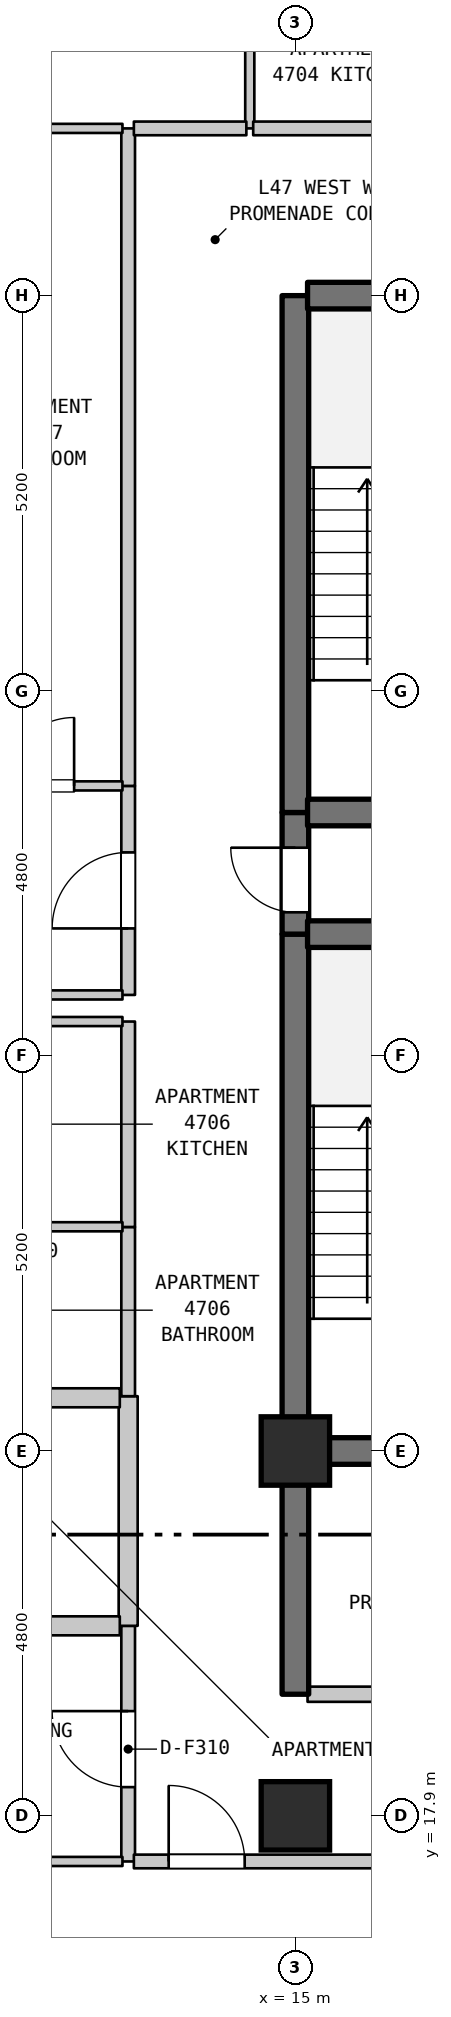
"""IFC4 building model, lengths in metres.
Left out: names, types, materials, properties, quantities, classifications, styles, units other than length and angle.
Written with IfcOpenShell. Run it as: python <this file> out.ifc"""

import sys

from ifc_helpers import new_model, si_unit, direction, frame, frame_2d, origin, origin_2d, place, context, subcontext, project, spatial, rectangle, extrude, element, fill, save


model = new_model("IFC4")
c1 = context("Model", 3, precision=1e-05, world=origin(), true_north=direction((0.0, 1.0)))
c2 = subcontext(c1, "Body", "Model", "MODEL_VIEW")
j1 = project(units=[si_unit("LENGTHUNIT", "METRE"), si_unit("PLANEANGLEUNIT", "RADIAN")], contexts=[c1])
p1 = place(None, origin())
s1 = spatial("IfcSite", under=j1, at=p1, CompositionType="ELEMENT")
p2 = place(p1, origin())
s2 = spatial("IfcBuilding", under=s1, at=p2, CompositionType="ELEMENT")
p3 = place(p2, frame((0.0, 0.0, 192.1)))
s3 = spatial("IfcBuildingStorey", under=s2, at=p3, CompositionType="ELEMENT", Elevation=192.1)
for number, where, z_axis, x_axis in (
    (1, (15.0, 17.9, 0.0), (0.0, 0.0, 1.0), (1.0, 0.0, 0.0)),
    (2, (15.0, 22.7, 0.0), (0.0, 0.0, 1.0), (1.0, 0.0, 0.0)),
):
    element("IfcColumn", number, at=place(p3, frame(where, z_axis=z_axis, x_axis=x_axis)), inside=s3, PredefinedType="COLUMN", context=c2, shape_type="SweptSolid", body=[
        extrude(rectangle(XDim=0.9, YDim=0.9, at=origin_2d()), origin(), (0.0, 0.0, 1.0), 3.7),
    ])
p4 = place(p3, frame((12.8, 17.3, 0.0), z_axis=(0.0, 0.0, 1.0), x_axis=(0.0, 1.0, 0.0)))
e3 = element("IfcWall", 3, at=p4, inside=s3, PredefinedType="STANDARD", context=c2, shape_type="SweptSolid", body=[
    extrude(rectangle(XDim=3.1, YDim=0.18, at=frame_2d((1.55, 0.0))), origin(), (0.0, 0.0, 1.0), 3.39),
])
p5 = place(p4, frame((0.978, 0.0, 0.0)))
e4 = element("IfcOpeningElement", 4, at=p5, cuts=e3, PredefinedType="OPENING", context=c2, shape_type="SweptSolid", body=[
    extrude(rectangle(XDim=1.0, YDim=2.15, at=frame_2d((0.5, 1.075))), frame((0.0, 0.1, 0.0), z_axis=(0.0, -1.0, 0.0), x_axis=(1.0, 0.0, 0.0)), (0.0, 0.0, 1.0), 0.2),
])
p6 = place(p3, frame((12.8, 20.4, 0.0), z_axis=(0.0, 0.0, 1.0), x_axis=(0.0, 1.0, 0.0)))
e5 = element("IfcWall", 5, at=p6, inside=s3, PredefinedType="STANDARD", context=c2, shape_type="SweptSolid", body=[
    extrude(rectangle(XDim=3.021, YDim=0.25, at=frame_2d((1.51, 0.0))), origin(), (0.0, 0.0, 1.0), 3.39),
])
p7 = place(p3, frame((12.8, 23.421, 0.0), z_axis=(0.0, 0.0, 1.0), x_axis=(0.0, 1.0, 0.0)))
e6 = element("IfcWall", 6, at=p7, inside=s3, PredefinedType="STANDARD", context=c2, shape_type="SweptSolid", body=[
    extrude(rectangle(XDim=2.226, YDim=0.18, at=frame_2d((1.113, 0.0))), origin(), (0.0, 0.0, 1.0), 3.39),
])
p8 = place(p3, frame((12.8, 25.647, 0.0), z_axis=(0.0, 0.0, 1.0), x_axis=(0.0, 1.0, 0.0)))
e7 = element("IfcWall", 7, at=p8, inside=s3, PredefinedType="STANDARD", context=c2, shape_type="SweptSolid", body=[
    extrude(rectangle(XDim=2.703, YDim=0.18, at=frame_2d((1.352, 0.0))), origin(), (0.0, 0.0, 1.0), 3.39),
])
p9 = place(p3, frame((12.8, 28.7, 0.0), z_axis=(0.0, 0.0, 1.0), x_axis=(0.0, 1.0, 0.0)))
e8 = element("IfcWall", 8, at=p9, inside=s3, PredefinedType="STANDARD", context=c2, shape_type="SweptSolid", body=[
    extrude(rectangle(XDim=2.75, YDim=0.18, at=frame_2d((1.375, 0.0))), origin(), (0.0, 0.0, 1.0), 3.39),
])
p10 = place(p9, frame((0.875, 0.0, 0.0)))
e9 = element("IfcOpeningElement", 9, at=p10, cuts=e8, PredefinedType="OPENING", context=c2, shape_type="SweptSolid", body=[
    extrude(rectangle(XDim=1.0, YDim=2.15, at=frame_2d((0.5, 1.075))), frame((0.0, 0.1, 0.0), z_axis=(0.0, -1.0, 0.0), x_axis=(1.0, 0.0, 0.0)), (0.0, 0.0, 1.0), 0.2),
])
p11 = place(p3, frame((12.8, 31.45, 0.0), z_axis=(0.0, 0.0, 1.0), x_axis=(0.0, 1.0, 0.0)))
e10 = element("IfcWall", 10, at=p11, inside=s3, PredefinedType="STANDARD", context=c2, shape_type="SweptSolid", body=[
    extrude(rectangle(XDim=8.65, YDim=0.18, at=frame_2d((4.325, 0.0))), origin(), (0.0, 0.0, 1.0), 3.39),
])
p12 = place(p3, frame((14.4, 40.1, 0.0), z_axis=(0.0, 0.0, 1.0), x_axis=(0.0, 1.0, 0.0)))
e11 = element("IfcWall", 11, at=p12, inside=s3, PredefinedType="PARTITIONING", context=c2, shape_type="SweptSolid", body=[
    extrude(rectangle(XDim=2.3, YDim=0.12, at=frame_2d((1.15, 0.0))), origin(), (0.0, 0.0, 1.0), 3.39),
])
p13 = place(p3, frame((15.0, 19.5, 0.0), z_axis=(0.0, 0.0, 1.0), x_axis=(0.0, 1.0, 0.0)))
e12 = element("IfcWall", 12, at=p13, inside=s3, PredefinedType="SHEAR", context=c2, shape_type="SweptSolid", body=[
    extrude(rectangle(XDim=3.2, YDim=0.35, at=frame_2d((1.6, 0.0))), origin(), (0.0, 0.0, 1.0), 3.39),
])
p14 = place(p3, frame((15.0, 22.7, 0.0), z_axis=(0.0, 0.0, 1.0), x_axis=(0.0, 1.0, 0.0)))
e13 = element("IfcWall", 13, at=p14, inside=s3, PredefinedType="SHEAR", context=c2, shape_type="SweptSolid", body=[
    extrude(rectangle(XDim=6.8, YDim=0.35, at=frame_2d((3.4, 0.0))), origin(), (0.0, 0.0, 1.0), 3.39),
])
p15 = place(p3, frame((15.0, 29.5, 0.0), z_axis=(0.0, 0.0, 1.0), x_axis=(0.0, 1.0, 0.0)))
e14 = element("IfcWall", 14, at=p15, inside=s3, PredefinedType="SHEAR", context=c2, shape_type="SweptSolid", body=[
    extrude(rectangle(XDim=1.6, YDim=0.35, at=frame_2d((0.8, 0.0))), origin(), (0.0, 0.0, 1.0), 3.39),
])
p16 = place(p15, frame((0.287, 0.0, 0.0)))
e15 = element("IfcOpeningElement", 15, at=p16, cuts=e14, PredefinedType="OPENING", context=c2, shape_type="SweptSolid", body=[
    extrude(rectangle(XDim=0.85, YDim=2.1, at=frame_2d((0.425, 1.05))), frame((0.0, 0.185, 0.0), z_axis=(0.0, -1.0, 0.0), x_axis=(1.0, 0.0, 0.0)), (0.0, 0.0, 1.0), 0.37),
])
p17 = place(p3, frame((15.0, 31.1, 0.0), z_axis=(0.0, 0.0, 1.0), x_axis=(0.0, 1.0, 0.0)))
e16 = element("IfcWall", 16, at=p17, inside=s3, PredefinedType="SHEAR", context=c2, shape_type="SweptSolid", body=[
    extrude(rectangle(XDim=6.8, YDim=0.35, at=frame_2d((3.4, 0.0))), origin(), (0.0, 0.0, 1.0), 3.39),
])
p18 = place(p3, frame((9.085, 17.3, 0.0), z_axis=(0.0, 0.0, 1.0), x_axis=(1.0, 0.0, 0.0)))
e17 = element("IfcWall", 17, at=p18, inside=s3, PredefinedType="PARTITIONING", context=c2, shape_type="SweptSolid", body=[
    extrude(rectangle(XDim=3.64, YDim=0.12, at=frame_2d((1.82, 0.0))), origin(), (0.0, 0.0, 1.0), 3.39),
])
p19 = place(p3, frame((12.875, 17.3, 0.0), z_axis=(0.0, 0.0, 1.0), x_axis=(1.0, 0.0, 0.0)))
e18 = element("IfcWall", 18, at=p19, inside=s3, PredefinedType="STANDARD", context=c2, shape_type="SweptSolid", body=[
    extrude(rectangle(XDim=3.78, YDim=0.18, at=frame_2d((1.89, 0.0))), origin(), (0.0, 0.0, 1.0), 3.39),
])
p20 = place(p19, frame((0.458, 0.0, 0.0)))
e19 = element("IfcOpeningElement", 19, at=p20, cuts=e18, PredefinedType="OPENING", context=c2, shape_type="SweptSolid", body=[
    extrude(rectangle(XDim=1.0, YDim=2.15, at=frame_2d((0.5, 1.075))), frame((0.0, 0.1, 0.0), z_axis=(0.0, -1.0, 0.0), x_axis=(1.0, 0.0, 0.0)), (0.0, 0.0, 1.0), 0.2),
])
p21 = place(p3, frame((15.16, 19.5, 0.0), z_axis=(0.0, 0.0, 1.0), x_axis=(1.0, 0.0, 0.0)))
e20 = element("IfcWall", 20, at=p21, inside=s3, PredefinedType="STANDARD", context=c2, shape_type="SweptSolid", body=[
    extrude(rectangle(XDim=3.68, YDim=0.2, at=frame_2d((1.84, 0.0))), origin(), (0.0, 0.0, 1.0), 3.39),
])
p22 = place(p21, frame((1.39, 0.0, 0.0)))
e21 = element("IfcOpeningElement", 21, at=p22, cuts=e20, PredefinedType="OPENING", context=c2, shape_type="SweptSolid", body=[
    extrude(rectangle(XDim=0.9, YDim=2.15, at=frame_2d((0.45, 1.075))), frame((0.0, 0.11, 0.0), z_axis=(0.0, -1.0, 0.0), x_axis=(1.0, 0.0, 0.0)), (0.0, 0.0, 1.0), 0.22),
])
p23 = place(p3, frame((10.66, 20.4, 0.0), z_axis=(0.0, 0.0, 1.0), x_axis=(1.0, 0.0, 0.0)))
e22 = element("IfcWall", 22, at=p23, inside=s3, PredefinedType="STANDARD", context=c2, shape_type="SweptSolid", body=[
    extrude(rectangle(XDim=2.03, YDim=0.25, at=frame_2d((1.015, 0.0))), origin(), (0.0, 0.0, 1.0), 3.39),
])
p24 = place(p3, frame((15.16, 22.7, 0.0), z_axis=(0.0, 0.0, 1.0), x_axis=(1.0, 0.0, 0.0)))
e23 = element("IfcWall", 23, at=p24, inside=s3, PredefinedType="SHEAR", context=c2, shape_type="SweptSolid", body=[
    extrude(rectangle(XDim=3.68, YDim=0.35, at=frame_2d((1.84, 0.0))), origin(), (0.0, 0.0, 1.0), 3.39),
])
p25 = place(p3, frame((10.66, 23.4, 0.0), z_axis=(0.0, 0.0, 1.0), x_axis=(1.0, 0.0, 0.0)))
e24 = element("IfcWall", 24, at=p25, inside=s3, PredefinedType="STANDARD", context=c2, shape_type="SweptSolid", body=[
    extrude(rectangle(XDim=2.03, YDim=0.25, at=frame_2d((1.015, 0.0))), origin(), (0.0, 0.0, 1.0), 3.39),
])
for number, where, z_axis, x_axis in (
    (25, (10.595, 25.65, 0.0), (0.0, 0.0, 1.0), (1.0, 0.0, 0.0)),
    (26, (10.595, 28.35, 0.0), (0.0, 0.0, 1.0), (1.0, 0.0, 0.0)),
):
    element("IfcWall", number, at=place(p3, frame(where, z_axis=z_axis, x_axis=x_axis)), inside=s3, PredefinedType="PARTITIONING", context=c2, shape_type="SweptSolid", body=[
        extrude(rectangle(XDim=2.13, YDim=0.12, at=frame_2d((1.065, 0.0))), origin(), (0.0, 0.0, 1.0), 3.39),
    ])
p26 = place(p3, frame((9.03, 28.7, 0.0), z_axis=(0.0, 0.0, 1.0), x_axis=(1.0, 0.0, 0.0)))
e27 = element("IfcWall", 27, at=p26, inside=s3, PredefinedType="PARTITIONING", context=c2, shape_type="SweptSolid", body=[
    extrude(rectangle(XDim=3.695, YDim=0.12, at=frame_2d((1.848, 0.0))), origin(), (0.0, 0.0, 1.0), 3.39),
])
for number, where, z_axis, x_axis in (
    (28, (15.16, 29.5, 0.0), (0.0, 0.0, 1.0), (1.0, 0.0, 0.0)),
    (29, (15.16, 31.1, 0.0), (0.0, 0.0, 1.0), (1.0, 0.0, 0.0)),
):
    element("IfcWall", number, at=place(p3, frame(where, z_axis=z_axis, x_axis=x_axis)), inside=s3, PredefinedType="SHEAR", context=c2, shape_type="SweptSolid", body=[
        extrude(rectangle(XDim=3.68, YDim=0.35, at=frame_2d((1.84, 0.0))), origin(), (0.0, 0.0, 1.0), 3.39),
    ])
p27 = place(p3, frame((10.523, 31.45, 0.0), z_axis=(0.0, 0.0, 1.0), x_axis=(1.0, 0.0, 0.0)))
e30 = element("IfcWall", 30, at=p27, inside=s3, PredefinedType="PARTITIONING", context=c2, shape_type="SweptSolid", body=[
    extrude(rectangle(XDim=2.202, YDim=0.12, at=frame_2d((1.101, 0.0))), origin(), (0.0, 0.0, 1.0), 3.39),
])
p28 = place(p27, frame((0.666, 0.0, 0.0)))
e31 = element("IfcOpeningElement", 31, at=p28, cuts=e30, PredefinedType="OPENING", context=c2, shape_type="SweptSolid", body=[
    extrude(rectangle(XDim=0.9, YDim=2.1, at=frame_2d((0.45, 1.05))), frame((0.0, 0.07, 0.0), z_axis=(0.0, -1.0, 0.0), x_axis=(1.0, 0.0, 0.0)), (0.0, 0.0, 1.0), 0.14),
])
p29 = place(p3, frame((15.16, 37.9, 0.0), z_axis=(0.0, 0.0, 1.0), x_axis=(1.0, 0.0, 0.0)))
e32 = element("IfcWall", 32, at=p29, inside=s3, PredefinedType="SHEAR", context=c2, shape_type="SweptSolid", body=[
    extrude(rectangle(XDim=3.68, YDim=0.35, at=frame_2d((1.84, 0.0))), origin(), (0.0, 0.0, 1.0), 3.39),
])
p30 = place(p3, frame((10.523, 40.1, 0.0), z_axis=(0.0, 0.0, 1.0), x_axis=(1.0, 0.0, 0.0)))
e33 = element("IfcWall", 33, at=p30, inside=s3, PredefinedType="PARTITIONING", context=c2, shape_type="SweptSolid", body=[
    extrude(rectangle(XDim=2.202, YDim=0.12, at=frame_2d((1.101, 0.0))), origin(), (0.0, 0.0, 1.0), 3.39),
])
p31 = place(p3, frame((12.875, 40.1, 0.0), z_axis=(0.0, 0.0, 1.0), x_axis=(1.0, 0.0, 0.0)))
e34 = element("IfcWall", 34, at=p31, inside=s3, PredefinedType="STANDARD", context=c2, shape_type="SweptSolid", body=[
    extrude(rectangle(XDim=1.48, YDim=0.18, at=frame_2d((0.74, 0.0))), origin(), (0.0, 0.0, 1.0), 3.39),
])
p32 = place(p3, frame((14.445, 40.1, 0.0), z_axis=(0.0, 0.0, 1.0), x_axis=(1.0, 0.0, 0.0)))
e35 = element("IfcWall", 35, at=p32, inside=s3, PredefinedType="STANDARD", context=c2, shape_type="SweptSolid", body=[
    extrude(rectangle(XDim=3.102, YDim=0.18, at=frame_2d((1.551, 0.0))), origin(), (0.0, 0.0, 1.0), 3.39),
])
p33 = place(p5, origin())
e36 = element("IfcDoor", 36, at=p33, inside=s3, OperationType="SINGLE_SWING_RIGHT", PredefinedType="DOOR", context=c2, shape_type="SweptSolid", body=[
    extrude(rectangle(XDim=1.0, YDim=2.15, at=frame_2d((0.5, 1.075))), frame((0.0, 0.025, 0.0), z_axis=(0.0, -1.0, 0.0), x_axis=(1.0, 0.0, 0.0)), (0.0, 0.0, 1.0), 0.05),
])
fill(e4, e36)
p34 = place(p10, origin())
e37 = element("IfcDoor", 37, at=p34, inside=s3, OperationType="SINGLE_SWING_LEFT", PredefinedType="DOOR", context=c2, shape_type="SweptSolid", body=[
    extrude(rectangle(XDim=1.0, YDim=2.15, at=frame_2d((0.5, 1.075))), frame((0.0, 0.025, 0.0), z_axis=(0.0, -1.0, 0.0), x_axis=(1.0, 0.0, 0.0)), (0.0, 0.0, 1.0), 0.05),
])
fill(e9, e37)
p35 = place(p16, origin())
e38 = element("IfcDoor", 38, at=p35, inside=s3, OperationType="SINGLE_SWING_RIGHT", PredefinedType="DOOR", context=c2, shape_type="SweptSolid", body=[
    extrude(rectangle(XDim=0.85, YDim=2.1, at=frame_2d((0.425, 1.05))), frame((0.0, 0.025, 0.0), z_axis=(0.0, -1.0, 0.0), x_axis=(1.0, 0.0, 0.0)), (0.0, 0.0, 1.0), 0.05),
])
fill(e15, e38)
p36 = place(p20, origin())
e39 = element("IfcDoor", 39, at=p36, inside=s3, OperationType="SINGLE_SWING_LEFT", PredefinedType="DOOR", context=c2, shape_type="SweptSolid", body=[
    extrude(rectangle(XDim=1.0, YDim=2.15, at=frame_2d((0.5, 1.075))), frame((0.0, 0.025, 0.0), z_axis=(0.0, -1.0, 0.0), x_axis=(1.0, 0.0, 0.0)), (0.0, 0.0, 1.0), 0.05),
])
fill(e19, e39)
p37 = place(p28, origin())
e40 = element("IfcDoor", 40, at=p37, inside=s3, OperationType="SINGLE_SWING_RIGHT", PredefinedType="DOOR", context=c2, shape_type="SweptSolid", body=[
    extrude(rectangle(XDim=0.9, YDim=2.1, at=frame_2d((0.45, 1.05))), frame((0.0, 0.025, 0.0), z_axis=(0.0, -1.0, 0.0), x_axis=(1.0, 0.0, 0.0)), (0.0, 0.0, 1.0), 0.05),
])
fill(e31, e40)
save(model, sys.argv[1])
